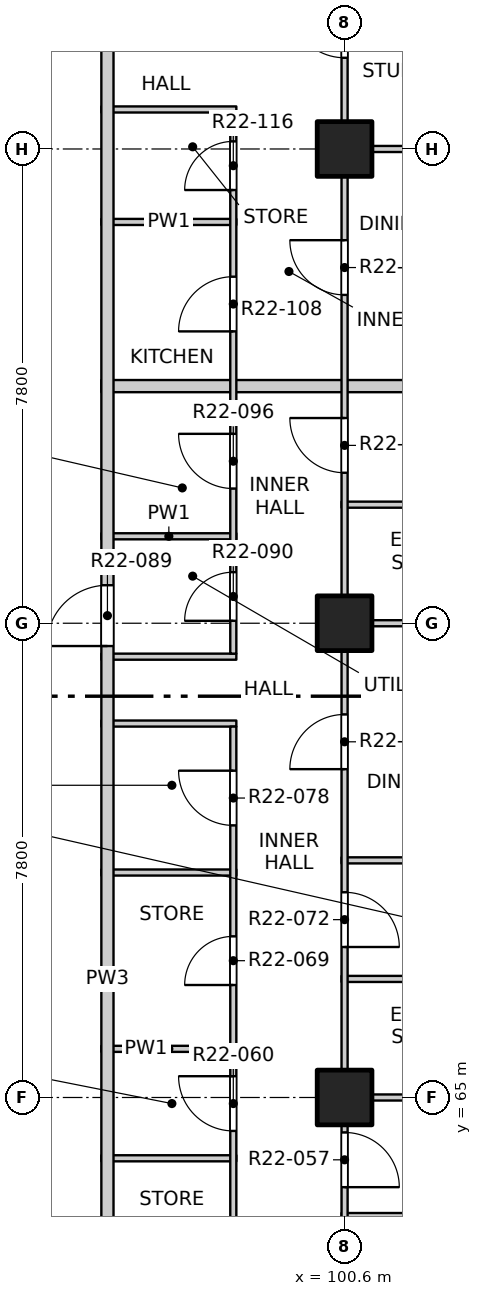
"""IFC4 building model, lengths in metres.
Left out: names, types, materials, properties, quantities, classifications, styles, units other than length and angle.
Written with IfcOpenShell. Run it as: python <this file> out.ifc"""

import sys

from ifc_helpers import new_model, si_unit, direction, frame, frame_2d, origin, origin_2d, place, context, subcontext, project, spatial, rectangle, extrude, element, fill, save


model = new_model("IFC4")
c1 = context("Model", 3, precision=1e-05, world=origin(), true_north=direction((0.0, 1.0)))
c2 = subcontext(c1, "Body", "Model", "MODEL_VIEW")
j1 = project(units=[si_unit("LENGTHUNIT", "METRE"), si_unit("PLANEANGLEUNIT", "RADIAN")], contexts=[c1])
p1 = place(None, origin())
s1 = spatial("IfcSite", under=j1, at=p1, CompositionType="ELEMENT")
p2 = place(p1, origin())
s2 = spatial("IfcBuilding", under=s1, at=p2, CompositionType="ELEMENT")
p3 = place(p2, frame((0.0, 0.0, 224.5)))
s3 = spatial("IfcBuildingStorey", under=s2, at=p3, CompositionType="ELEMENT", Elevation=224.5)
for number, where, z_axis, x_axis in (
    (1, (100.6, 65.0, -0.25), (0.0, 0.0, 1.0), (1.0, 0.0, 0.0)),
    (2, (100.6, 72.8, -0.25), (0.0, 0.0, 1.0), (1.0, 0.0, 0.0)),
    (3, (100.6, 80.6, -0.25), (0.0, 0.0, 1.0), (1.0, 0.0, 0.0)),
):
    element("IfcColumn", number, at=place(p3, frame(where, z_axis=z_axis, x_axis=x_axis)), inside=s3, PredefinedType="COLUMN", context=c2, shape_type="SweptSolid", body=[
        extrude(rectangle(XDim=0.9, YDim=0.9, at=origin_2d()), origin(), (0.0, 0.0, 1.0), 3.4),
    ])
p4 = place(p3, frame((100.55, 63.05, 0.0), z_axis=(0.0, 0.0, 1.0), x_axis=(1.0, 0.0, 0.0)))
e4 = element("IfcWall", 4, at=p4, inside=s3, PredefinedType="PARTITIONING", context=c2, shape_type="SweptSolid", body=[
    extrude(rectangle(XDim=3.7, YDim=0.1, at=frame_2d((1.85, 0.0))), origin(), (0.0, 0.0, 1.0), 3.15),
])
p5 = place(p3, frame((96.6, 64.0, 0.0), z_axis=(0.0, 0.0, 1.0), x_axis=(1.0, 0.0, 0.0)))
e5 = element("IfcWall", 5, at=p5, inside=s3, PredefinedType="PARTITIONING", context=c2, shape_type="SweptSolid", body=[
    extrude(rectangle(XDim=2.22, YDim=0.1, at=frame_2d((1.11, 0.0))), origin(), (0.0, 0.0, 1.0), 3.15),
])
p6 = place(p3, frame((100.55, 65.0, 0.0), z_axis=(0.0, 0.0, 1.0), x_axis=(1.0, 0.0, 0.0)))
e6 = element("IfcWall", 6, at=p6, inside=s3, PredefinedType="PARTITIONING", context=c2, shape_type="SweptSolid", body=[
    extrude(rectangle(XDim=7.55, YDim=0.1, at=frame_2d((3.775, 0.0))), origin(), (0.0, 0.0, 1.0), 3.15),
])
p7 = place(p3, frame((96.6, 65.8, 0.0), z_axis=(0.0, 0.0, 1.0), x_axis=(1.0, 0.0, 0.0)))
e7 = element("IfcWall", 7, at=p7, inside=s3, PredefinedType="PARTITIONING", context=c2, shape_type="SweptSolid", body=[
    extrude(rectangle(XDim=2.22, YDim=0.1, at=frame_2d((1.11, 0.0))), origin(), (0.0, 0.0, 1.0), 3.15),
])
p8 = place(p3, frame((100.55, 66.95, 0.0), z_axis=(0.0, 0.0, 1.0), x_axis=(1.0, 0.0, 0.0)))
e8 = element("IfcWall", 8, at=p8, inside=s3, PredefinedType="PARTITIONING", context=c2, shape_type="SweptSolid", body=[
    extrude(rectangle(XDim=3.7, YDim=0.1, at=frame_2d((1.85, 0.0))), origin(), (0.0, 0.0, 1.0), 3.15),
])
p9 = place(p3, frame((96.6, 68.7, 0.0), z_axis=(0.0, 0.0, 1.0), x_axis=(1.0, 0.0, 0.0)))
e9 = element("IfcWall", 9, at=p9, inside=s3, PredefinedType="PARTITIONING", context=c2, shape_type="SweptSolid", body=[
    extrude(rectangle(XDim=2.22, YDim=0.1, at=frame_2d((1.11, 0.0))), origin(), (0.0, 0.0, 1.0), 2.55),
])
p10 = place(p3, frame((100.55, 68.9, 0.0), z_axis=(0.0, 0.0, 1.0), x_axis=(1.0, 0.0, 0.0)))
e10 = element("IfcWall", 10, at=p10, inside=s3, PredefinedType="PARTITIONING", context=c2, shape_type="SweptSolid", body=[
    extrude(rectangle(XDim=7.55, YDim=0.1, at=frame_2d((3.775, 0.0))), origin(), (0.0, 0.0, 1.0), 2.55),
])
for number, where, z_axis, x_axis in (
    (11, (96.6, 71.15, 0.0), (0.0, 0.0, 1.0), (1.0, 0.0, 0.0)),
    (12, (96.6, 72.25, 0.0), (0.0, 0.0, 1.0), (1.0, 0.0, 0.0)),
):
    element("IfcWall", number, at=place(p3, frame(where, z_axis=z_axis, x_axis=x_axis)), inside=s3, PredefinedType="PARTITIONING", context=c2, shape_type="SweptSolid", body=[
        extrude(rectangle(XDim=2.22, YDim=0.1, at=frame_2d((1.11, 0.0))), origin(), (0.0, 0.0, 1.0), 3.15),
    ])
p11 = place(p3, frame((100.55, 72.8, 0.0), z_axis=(0.0, 0.0, 1.0), x_axis=(1.0, 0.0, 0.0)))
e13 = element("IfcWall", 13, at=p11, inside=s3, PredefinedType="PARTITIONING", context=c2, shape_type="SweptSolid", body=[
    extrude(rectangle(XDim=7.55, YDim=0.1, at=frame_2d((3.775, 0.0))), origin(), (0.0, 0.0, 1.0), 3.15),
])
p12 = place(p3, frame((96.6, 74.23, 0.0), z_axis=(0.0, 0.0, 1.0), x_axis=(1.0, 0.0, 0.0)))
e14 = element("IfcWall", 14, at=p12, inside=s3, PredefinedType="PARTITIONING", context=c2, shape_type="SweptSolid", body=[
    extrude(rectangle(XDim=2.22, YDim=0.1, at=frame_2d((1.11, 0.0))), origin(), (0.0, 0.0, 1.0), 3.15),
])
p13 = place(p3, frame((100.55, 74.75, 0.0), z_axis=(0.0, 0.0, 1.0), x_axis=(1.0, 0.0, 0.0)))
e15 = element("IfcWall", 15, at=p13, inside=s3, PredefinedType="PARTITIONING", context=c2, shape_type="SweptSolid", body=[
    extrude(rectangle(XDim=3.7, YDim=0.1, at=frame_2d((1.85, 0.0))), origin(), (0.0, 0.0, 1.0), 3.15),
])
p14 = place(p3, frame((96.6, 76.7, 0.0), z_axis=(0.0, 0.0, 1.0), x_axis=(1.0, 0.0, 0.0)))
e16 = element("IfcWall", 16, at=p14, inside=s3, PredefinedType="PARTITIONING", context=c2, shape_type="SweptSolid", body=[
    extrude(rectangle(XDim=11.5, YDim=0.2, at=frame_2d((5.75, 0.0))), origin(), (0.0, 0.0, 1.0), 2.55),
])
p15 = place(p3, frame((96.6, 79.4, 0.0), z_axis=(0.0, 0.0, 1.0), x_axis=(1.0, 0.0, 0.0)))
e17 = element("IfcWall", 17, at=p15, inside=s3, PredefinedType="PARTITIONING", context=c2, shape_type="SweptSolid", body=[
    extrude(rectangle(XDim=2.22, YDim=0.1, at=frame_2d((1.11, 0.0))), origin(), (0.0, 0.0, 1.0), 3.15),
])
p16 = place(p3, frame((100.55, 80.6, 0.0), z_axis=(0.0, 0.0, 1.0), x_axis=(1.0, 0.0, 0.0)))
e18 = element("IfcWall", 18, at=p16, inside=s3, PredefinedType="PARTITIONING", context=c2, shape_type="SweptSolid", body=[
    extrude(rectangle(XDim=7.55, YDim=0.1, at=frame_2d((3.775, 0.0))), origin(), (0.0, 0.0, 1.0), 3.15),
])
p17 = place(p3, frame((96.6, 81.25, 0.0), z_axis=(0.0, 0.0, 1.0), x_axis=(1.0, 0.0, 0.0)))
e19 = element("IfcWall", 19, at=p17, inside=s3, PredefinedType="PARTITIONING", context=c2, shape_type="SweptSolid", body=[
    extrude(rectangle(XDim=2.22, YDim=0.1, at=frame_2d((1.11, 0.0))), origin(), (0.0, 0.0, 1.0), 3.15),
])
p18 = place(p3, frame((96.7, 49.5, 0.0), z_axis=(0.0, 0.0, 1.0), x_axis=(0.0, 1.0, 0.0)))
e20 = element("IfcWall", 20, at=p18, inside=s3, PredefinedType="PARTITIONING", context=c2, shape_type="SweptSolid", body=[
    extrude(rectangle(XDim=34.9, YDim=0.2, at=frame_2d((17.45, 0.0))), origin(), (0.0, 0.0, 1.0), 3.15),
])
p19 = place(p18, frame((9.675, 0.0, 0.0)))
e21 = element("IfcOpeningElement", 21, at=p19, cuts=e20, PredefinedType="OPENING", context=c2, shape_type="SweptSolid", body=[
    extrude(rectangle(XDim=1.0, YDim=2.1, at=frame_2d((0.5, 1.05))), frame((0.0, 0.11, 0.0), z_axis=(0.0, -1.0, 0.0), x_axis=(1.0, 0.0, 0.0)), (0.0, 0.0, 1.0), 0.22),
])
p20 = place(p18, frame((22.925, 0.0, 0.0)))
e22 = element("IfcOpeningElement", 22, at=p20, cuts=e20, PredefinedType="OPENING", context=c2, shape_type="SweptSolid", body=[
    extrude(rectangle(XDim=1.0, YDim=2.1, at=frame_2d((0.5, 1.05))), frame((0.0, 0.11, 0.0), z_axis=(0.0, -1.0, 0.0), x_axis=(1.0, 0.0, 0.0)), (0.0, 0.0, 1.0), 0.22),
])
p21 = place(p18, frame((33.025, 0.0, 0.0)))
e23 = element("IfcOpeningElement", 23, at=p21, cuts=e20, PredefinedType="OPENING", context=c2, shape_type="SweptSolid", body=[
    extrude(rectangle(XDim=1.0, YDim=2.1, at=frame_2d((0.5, 1.05))), frame((0.0, 0.11, 0.0), z_axis=(0.0, -1.0, 0.0), x_axis=(1.0, 0.0, 0.0)), (0.0, 0.0, 1.0), 0.22),
])
p22 = place(p3, frame((98.77, 59.05, 0.0), z_axis=(0.0, 0.0, 1.0), x_axis=(0.0, 1.0, 0.0)))
e24 = element("IfcWall", 24, at=p22, inside=s3, PredefinedType="PARTITIONING", context=c2, shape_type="SweptSolid", body=[
    extrude(rectangle(XDim=12.05, YDim=0.1, at=frame_2d((6.025, 0.0))), origin(), (0.0, 0.0, 1.0), 3.15),
])
p23 = place(p22, frame((0.55, 0.0, 0.0)))
e25 = element("IfcOpeningElement", 25, at=p23, cuts=e24, PredefinedType="OPENING", context=c2, shape_type="SweptSolid", body=[
    extrude(rectangle(XDim=0.9, YDim=2.1, at=frame_2d((0.45, 1.05))), frame((0.0, 0.06, 0.0), z_axis=(0.0, -1.0, 0.0), x_axis=(1.0, 0.0, 0.0)), (0.0, 0.0, 1.0), 0.12),
])
p24 = place(p22, frame((3.1, 0.0, 0.0)))
e26 = element("IfcOpeningElement", 26, at=p24, cuts=e24, PredefinedType="OPENING", context=c2, shape_type="SweptSolid", body=[
    extrude(rectangle(XDim=0.8, YDim=2.1, at=frame_2d((0.4, 1.05))), frame((0.0, 0.06, 0.0), z_axis=(0.0, -1.0, 0.0), x_axis=(1.0, 0.0, 0.0)), (0.0, 0.0, 1.0), 0.12),
])
p25 = place(p22, frame((5.4, 0.0, 0.0)))
e27 = element("IfcOpeningElement", 27, at=p25, cuts=e24, PredefinedType="OPENING", context=c2, shape_type="SweptSolid", body=[
    extrude(rectangle(XDim=0.9, YDim=2.1, at=frame_2d((0.45, 1.05))), frame((0.0, 0.06, 0.0), z_axis=(0.0, -1.0, 0.0), x_axis=(1.0, 0.0, 0.0)), (0.0, 0.0, 1.0), 0.12),
])
p26 = place(p22, frame((7.8, 0.0, 0.0)))
e28 = element("IfcOpeningElement", 28, at=p26, cuts=e24, PredefinedType="OPENING", context=c2, shape_type="SweptSolid", body=[
    extrude(rectangle(XDim=0.8, YDim=2.1, at=frame_2d((0.4, 1.05))), frame((0.0, 0.06, 0.0), z_axis=(0.0, -1.0, 0.0), x_axis=(1.0, 0.0, 0.0)), (0.0, 0.0, 1.0), 0.12),
])
p27 = place(p22, frame((10.425, 0.0, 0.0)))
e29 = element("IfcOpeningElement", 29, at=p27, cuts=e24, PredefinedType="OPENING", context=c2, shape_type="SweptSolid", body=[
    extrude(rectangle(XDim=0.9, YDim=2.1, at=frame_2d((0.45, 1.05))), frame((0.0, 0.06, 0.0), z_axis=(0.0, -1.0, 0.0), x_axis=(1.0, 0.0, 0.0)), (0.0, 0.0, 1.0), 0.12),
])
p28 = place(p3, frame((98.77, 72.3, 0.0), z_axis=(0.0, 0.0, 1.0), x_axis=(0.0, 1.0, 0.0)))
e30 = element("IfcWall", 30, at=p28, inside=s3, PredefinedType="PARTITIONING", context=c2, shape_type="SweptSolid", body=[
    extrude(rectangle(XDim=8.9, YDim=0.1, at=frame_2d((4.45, 0.0))), origin(), (0.0, 0.0, 1.0), 3.15),
])
p29 = place(p28, frame((0.54, 0.0, 0.0)))
e31 = element("IfcOpeningElement", 31, at=p29, cuts=e30, PredefinedType="OPENING", context=c2, shape_type="SweptSolid", body=[
    extrude(rectangle(XDim=0.8, YDim=2.1, at=frame_2d((0.4, 1.05))), frame((0.0, 0.06, 0.0), z_axis=(0.0, -1.0, 0.0), x_axis=(1.0, 0.0, 0.0)), (0.0, 0.0, 1.0), 0.12),
])
p30 = place(p28, frame((2.715, 0.0, 0.0)))
e32 = element("IfcOpeningElement", 32, at=p30, cuts=e30, PredefinedType="OPENING", context=c2, shape_type="SweptSolid", body=[
    extrude(rectangle(XDim=0.9, YDim=2.1, at=frame_2d((0.45, 1.05))), frame((0.0, 0.06, 0.0), z_axis=(0.0, -1.0, 0.0), x_axis=(1.0, 0.0, 0.0)), (0.0, 0.0, 1.0), 0.12),
])
p31 = place(p28, frame((5.3, 0.0, 0.0)))
e33 = element("IfcOpeningElement", 33, at=p31, cuts=e30, PredefinedType="OPENING", context=c2, shape_type="SweptSolid", body=[
    extrude(rectangle(XDim=0.9, YDim=2.1, at=frame_2d((0.45, 1.05))), frame((0.0, 0.06, 0.0), z_axis=(0.0, -1.0, 0.0), x_axis=(1.0, 0.0, 0.0)), (0.0, 0.0, 1.0), 0.12),
])
p32 = place(p28, frame((7.625, 0.0, 0.0)))
e34 = element("IfcOpeningElement", 34, at=p32, cuts=e30, PredefinedType="OPENING", context=c2, shape_type="SweptSolid", body=[
    extrude(rectangle(XDim=0.8, YDim=2.1, at=frame_2d((0.4, 1.05))), frame((0.0, 0.06, 0.0), z_axis=(0.0, -1.0, 0.0), x_axis=(1.0, 0.0, 0.0)), (0.0, 0.0, 1.0), 0.12),
])
p33 = place(p3, frame((100.6, 41.9, 0.0), z_axis=(0.0, 0.0, 1.0), x_axis=(0.0, 1.0, 0.0)))
e35 = element("IfcWall", 35, at=p33, inside=s3, PredefinedType="PARTITIONING", context=c2, shape_type="SweptSolid", body=[
    extrude(rectangle(XDim=46.2, YDim=0.1, at=frame_2d((23.1, 0.0))), origin(), (0.0, 0.0, 1.0), 3.15),
])
p34 = place(p33, frame((1.2, 0.0, 0.0)))
e36 = element("IfcOpeningElement", 36, at=p34, cuts=e35, PredefinedType="OPENING", context=c2, shape_type="SweptSolid", body=[
    extrude(rectangle(XDim=0.9, YDim=2.1, at=frame_2d((0.45, 1.05))), frame((0.0, 0.06, 0.0), z_axis=(0.0, -1.0, 0.0), x_axis=(1.0, 0.0, 0.0)), (0.0, 0.0, 1.0), 0.12),
])
p35 = place(p33, frame((6.025, 0.0, 0.0)))
e37 = element("IfcOpeningElement", 37, at=p35, cuts=e35, PredefinedType="OPENING", context=c2, shape_type="SweptSolid", body=[
    extrude(rectangle(XDim=0.9, YDim=2.1, at=frame_2d((0.45, 1.05))), frame((0.0, 0.06, 0.0), z_axis=(0.0, -1.0, 0.0), x_axis=(1.0, 0.0, 0.0)), (0.0, 0.0, 1.0), 0.12),
])
p36 = place(p33, frame((9.0, 0.0, 0.0)))
e38 = element("IfcOpeningElement", 38, at=p36, cuts=e35, PredefinedType="OPENING", context=c2, shape_type="SweptSolid", body=[
    extrude(rectangle(XDim=0.9, YDim=2.1, at=frame_2d((0.45, 1.05))), frame((0.0, 0.06, 0.0), z_axis=(0.0, -1.0, 0.0), x_axis=(1.0, 0.0, 0.0)), (0.0, 0.0, 1.0), 0.12),
])
p37 = place(p33, frame((12.9, 0.0, 0.0)))
e39 = element("IfcOpeningElement", 39, at=p37, cuts=e35, PredefinedType="OPENING", context=c2, shape_type="SweptSolid", body=[
    extrude(rectangle(XDim=0.9, YDim=2.1, at=frame_2d((0.45, 1.05))), frame((0.0, 0.06, 0.0), z_axis=(0.0, -1.0, 0.0), x_axis=(1.0, 0.0, 0.0)), (0.0, 0.0, 1.0), 0.12),
])
p38 = place(p33, frame((17.775, 0.0, 0.0)))
e40 = element("IfcOpeningElement", 40, at=p38, cuts=e35, PredefinedType="OPENING", context=c2, shape_type="SweptSolid", body=[
    extrude(rectangle(XDim=0.9, YDim=2.1, at=frame_2d((0.45, 1.05))), frame((0.0, 0.06, 0.0), z_axis=(0.0, -1.0, 0.0), x_axis=(1.0, 0.0, 0.0)), (0.0, 0.0, 1.0), 0.12),
])
p39 = place(p33, frame((21.625, 0.0, 0.0)))
e41 = element("IfcOpeningElement", 41, at=p39, cuts=e35, PredefinedType="OPENING", context=c2, shape_type="SweptSolid", body=[
    extrude(rectangle(XDim=0.9, YDim=2.1, at=frame_2d((0.45, 1.05))), frame((0.0, 0.06, 0.0), z_axis=(0.0, -1.0, 0.0), x_axis=(1.0, 0.0, 0.0)), (0.0, 0.0, 1.0), 0.12),
])
p40 = place(p33, frame((25.575, 0.0, 0.0)))
e42 = element("IfcOpeningElement", 42, at=p40, cuts=e35, PredefinedType="OPENING", context=c2, shape_type="SweptSolid", body=[
    extrude(rectangle(XDim=0.9, YDim=2.1, at=frame_2d((0.45, 1.05))), frame((0.0, 0.06, 0.0), z_axis=(0.0, -1.0, 0.0), x_axis=(1.0, 0.0, 0.0)), (0.0, 0.0, 1.0), 0.12),
])
p41 = place(p33, frame((28.5, 0.0, 0.0)))
e43 = element("IfcOpeningElement", 43, at=p41, cuts=e35, PredefinedType="OPENING", context=c2, shape_type="SweptSolid", body=[
    extrude(rectangle(XDim=0.9, YDim=2.1, at=frame_2d((0.45, 1.05))), frame((0.0, 0.06, 0.0), z_axis=(0.0, -1.0, 0.0), x_axis=(1.0, 0.0, 0.0)), (0.0, 0.0, 1.0), 0.12),
])
p42 = place(p33, frame((33.375, 0.0, 0.0)))
e44 = element("IfcOpeningElement", 44, at=p42, cuts=e35, PredefinedType="OPENING", context=c2, shape_type="SweptSolid", body=[
    extrude(rectangle(XDim=0.9, YDim=2.1, at=frame_2d((0.45, 1.05))), frame((0.0, 0.06, 0.0), z_axis=(0.0, -1.0, 0.0), x_axis=(1.0, 0.0, 0.0)), (0.0, 0.0, 1.0), 0.12),
])
p43 = place(p33, frame((36.3, 0.0, 0.0)))
e45 = element("IfcOpeningElement", 45, at=p43, cuts=e35, PredefinedType="OPENING", context=c2, shape_type="SweptSolid", body=[
    extrude(rectangle(XDim=0.9, YDim=2.1, at=frame_2d((0.45, 1.05))), frame((0.0, 0.06, 0.0), z_axis=(0.0, -1.0, 0.0), x_axis=(1.0, 0.0, 0.0)), (0.0, 0.0, 1.0), 0.12),
])
p44 = place(p33, frame((40.2, 0.0, 0.0)))
e46 = element("IfcOpeningElement", 46, at=p44, cuts=e35, PredefinedType="OPENING", context=c2, shape_type="SweptSolid", body=[
    extrude(rectangle(XDim=0.9, YDim=2.1, at=frame_2d((0.45, 1.05))), frame((0.0, 0.06, 0.0), z_axis=(0.0, -1.0, 0.0), x_axis=(1.0, 0.0, 0.0)), (0.0, 0.0, 1.0), 0.12),
])
p45 = place(p33, frame((44.1, 0.0, 0.0)))
e47 = element("IfcOpeningElement", 47, at=p45, cuts=e35, PredefinedType="OPENING", context=c2, shape_type="SweptSolid", body=[
    extrude(rectangle(XDim=0.9, YDim=2.1, at=frame_2d((0.45, 1.05))), frame((0.0, 0.06, 0.0), z_axis=(0.0, -1.0, 0.0), x_axis=(1.0, 0.0, 0.0)), (0.0, 0.0, 1.0), 0.12),
])
p46 = place(p39, origin())
e48 = element("IfcDoor", 48, at=p46, inside=s3, OperationType="SINGLE_SWING_RIGHT", PredefinedType="DOOR", context=c2, shape_type="SweptSolid", body=[
    extrude(rectangle(XDim=0.9, YDim=2.1, at=frame_2d((0.45, 1.05))), frame((0.0, 0.025, 0.0), z_axis=(0.0, -1.0, 0.0), x_axis=(1.0, 0.0, 0.0)), (0.0, 0.0, 1.0), 0.05),
])
fill(e41, e48)
p47 = place(p25, origin())
e49 = element("IfcDoor", 49, at=p47, inside=s3, OperationType="SINGLE_SWING_RIGHT", PredefinedType="DOOR", context=c2, shape_type="SweptSolid", body=[
    extrude(rectangle(XDim=0.9, YDim=2.1, at=frame_2d((0.45, 1.05))), frame((0.0, 0.025, 0.0), z_axis=(0.0, -1.0, 0.0), x_axis=(1.0, 0.0, 0.0)), (0.0, 0.0, 1.0), 0.05),
])
fill(e27, e49)
p48 = place(p26, origin())
e50 = element("IfcDoor", 50, at=p48, inside=s3, OperationType="SINGLE_SWING_LEFT", PredefinedType="DOOR", context=c2, shape_type="SweptSolid", body=[
    extrude(rectangle(XDim=0.8, YDim=2.1, at=frame_2d((0.4, 1.05))), frame((0.0, 0.025, 0.0), z_axis=(0.0, -1.0, 0.0), x_axis=(1.0, 0.0, 0.0)), (0.0, 0.0, 1.0), 0.05),
])
fill(e28, e50)
p49 = place(p40, origin())
e51 = element("IfcDoor", 51, at=p49, inside=s3, OperationType="SINGLE_SWING_RIGHT", PredefinedType="DOOR", context=c2, shape_type="SweptSolid", body=[
    extrude(rectangle(XDim=0.9, YDim=2.1, at=frame_2d((0.45, 1.05))), frame((0.0, 0.025, 0.0), z_axis=(0.0, -1.0, 0.0), x_axis=(1.0, 0.0, 0.0)), (0.0, 0.0, 1.0), 0.05),
])
fill(e42, e51)
p50 = place(p27, origin())
e52 = element("IfcDoor", 52, at=p50, inside=s3, OperationType="SINGLE_SWING_RIGHT", PredefinedType="DOOR", context=c2, shape_type="SweptSolid", body=[
    extrude(rectangle(XDim=0.9, YDim=2.1, at=frame_2d((0.45, 1.05))), frame((0.0, 0.025, 0.0), z_axis=(0.0, -1.0, 0.0), x_axis=(1.0, 0.0, 0.0)), (0.0, 0.0, 1.0), 0.05),
])
fill(e29, e52)
p51 = place(p41, origin())
e53 = element("IfcDoor", 53, at=p51, inside=s3, OperationType="SINGLE_SWING_LEFT", PredefinedType="DOOR", context=c2, shape_type="SweptSolid", body=[
    extrude(rectangle(XDim=0.9, YDim=2.1, at=frame_2d((0.45, 1.05))), frame((0.0, 0.025, 0.0), z_axis=(0.0, -1.0, 0.0), x_axis=(1.0, 0.0, 0.0)), (0.0, 0.0, 1.0), 0.05),
])
fill(e43, e53)
p52 = place(p20, origin())
e54 = element("IfcDoor", 54, at=p52, inside=s3, OperationType="SINGLE_SWING_LEFT", PredefinedType="DOOR", context=c2, shape_type="SweptSolid", body=[
    extrude(rectangle(XDim=1.0, YDim=2.1, at=frame_2d((0.5, 1.05))), frame((0.0, 0.025, 0.0), z_axis=(0.0, -1.0, 0.0), x_axis=(1.0, 0.0, 0.0)), (0.0, 0.0, 1.0), 0.05),
])
fill(e22, e54)
p53 = place(p29, origin())
e55 = element("IfcDoor", 55, at=p53, inside=s3, OperationType="SINGLE_SWING_LEFT", PredefinedType="DOOR", context=c2, shape_type="SweptSolid", body=[
    extrude(rectangle(XDim=0.8, YDim=2.1, at=frame_2d((0.4, 1.05))), frame((0.0, 0.025, 0.0), z_axis=(0.0, -1.0, 0.0), x_axis=(1.0, 0.0, 0.0)), (0.0, 0.0, 1.0), 0.05),
])
fill(e31, e55)
p54 = place(p30, origin())
e56 = element("IfcDoor", 56, at=p54, inside=s3, OperationType="SINGLE_SWING_RIGHT", PredefinedType="DOOR", context=c2, shape_type="SweptSolid", body=[
    extrude(rectangle(XDim=0.9, YDim=2.1, at=frame_2d((0.45, 1.05))), frame((0.0, 0.025, 0.0), z_axis=(0.0, -1.0, 0.0), x_axis=(1.0, 0.0, 0.0)), (0.0, 0.0, 1.0), 0.05),
])
fill(e32, e56)
p55 = place(p42, origin())
e57 = element("IfcDoor", 57, at=p55, inside=s3, OperationType="SINGLE_SWING_RIGHT", PredefinedType="DOOR", context=c2, shape_type="SweptSolid", body=[
    extrude(rectangle(XDim=0.9, YDim=2.1, at=frame_2d((0.45, 1.05))), frame((0.0, 0.025, 0.0), z_axis=(0.0, -1.0, 0.0), x_axis=(1.0, 0.0, 0.0)), (0.0, 0.0, 1.0), 0.05),
])
fill(e44, e57)
p56 = place(p31, origin())
e58 = element("IfcDoor", 58, at=p56, inside=s3, OperationType="SINGLE_SWING_LEFT", PredefinedType="DOOR", context=c2, shape_type="SweptSolid", body=[
    extrude(rectangle(XDim=0.9, YDim=2.1, at=frame_2d((0.45, 1.05))), frame((0.0, 0.025, 0.0), z_axis=(0.0, -1.0, 0.0), x_axis=(1.0, 0.0, 0.0)), (0.0, 0.0, 1.0), 0.05),
])
fill(e33, e58)
p57 = place(p43, origin())
e59 = element("IfcDoor", 59, at=p57, inside=s3, OperationType="SINGLE_SWING_RIGHT", PredefinedType="DOOR", context=c2, shape_type="SweptSolid", body=[
    extrude(rectangle(XDim=0.9, YDim=2.1, at=frame_2d((0.45, 1.05))), frame((0.0, 0.025, 0.0), z_axis=(0.0, -1.0, 0.0), x_axis=(1.0, 0.0, 0.0)), (0.0, 0.0, 1.0), 0.05),
])
fill(e45, e59)
p58 = place(p32, origin())
e60 = element("IfcDoor", 60, at=p58, inside=s3, OperationType="SINGLE_SWING_LEFT", PredefinedType="DOOR", context=c2, shape_type="SweptSolid", body=[
    extrude(rectangle(XDim=0.8, YDim=2.1, at=frame_2d((0.4, 1.05))), frame((0.0, 0.025, 0.0), z_axis=(0.0, -1.0, 0.0), x_axis=(1.0, 0.0, 0.0)), (0.0, 0.0, 1.0), 0.05),
])
fill(e34, e60)
p59 = place(p44, origin())
e61 = element("IfcDoor", 61, at=p59, inside=s3, OperationType="SINGLE_SWING_RIGHT", PredefinedType="DOOR", context=c2, shape_type="SweptSolid", body=[
    extrude(rectangle(XDim=0.9, YDim=2.1, at=frame_2d((0.45, 1.05))), frame((0.0, 0.025, 0.0), z_axis=(0.0, -1.0, 0.0), x_axis=(1.0, 0.0, 0.0)), (0.0, 0.0, 1.0), 0.05),
])
fill(e46, e61)
save(model, sys.argv[1])
